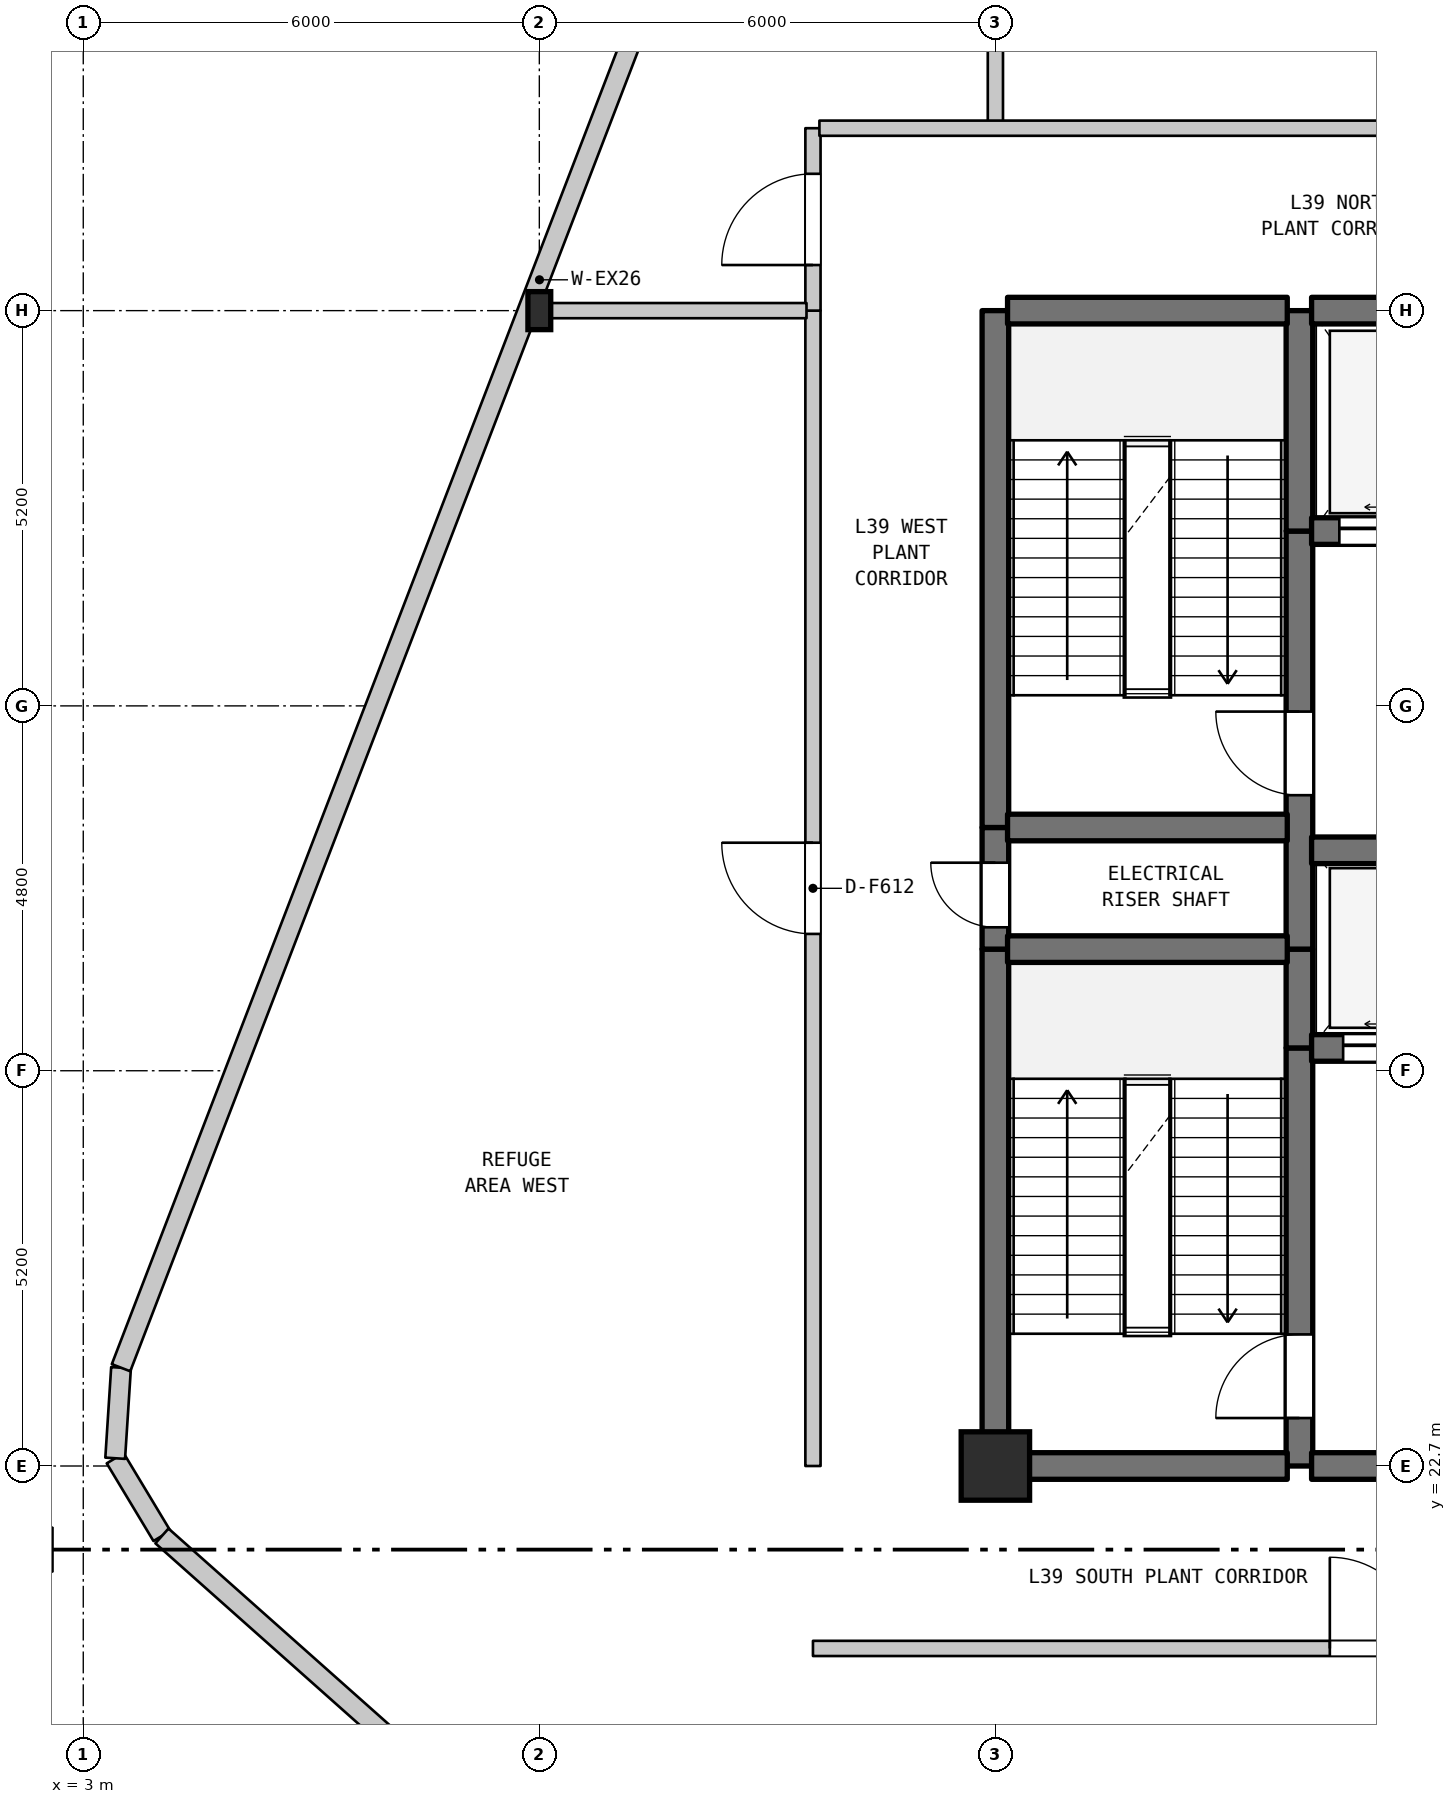
"""IFC4 building model, lengths in metres.
Left out: names, types, materials, properties, quantities, classifications, styles, units other than length and angle.
Written with IfcOpenShell. Run it as: python <this file> out.ifc"""

import sys

from ifc_helpers import new_model, si_unit, direction, frame, frame_2d, origin, origin_2d, place, context, subcontext, project, spatial, rectangle, i_section, extrude, element, fill, save


model = new_model("IFC4")
c1 = context("Model", 3, precision=1e-05, world=origin(), true_north=direction((0.0, 1.0)))
c2 = subcontext(c1, "Body", "Model", "MODEL_VIEW")
j1 = project(units=[si_unit("LENGTHUNIT", "METRE"), si_unit("PLANEANGLEUNIT", "RADIAN")], contexts=[c1])
p1 = place(None, origin())
s1 = spatial("IfcSite", under=j1, at=p1, CompositionType="ELEMENT")
p2 = place(p1, origin())
s2 = spatial("IfcBuilding", under=s1, at=p2, CompositionType="ELEMENT")
p3 = place(p2, frame((0.0, 0.0, 159.4)))
s3 = spatial("IfcBuildingStorey", under=s2, at=p3, CompositionType="ELEMENT", Elevation=159.4)
p4 = place(p3, frame((9.0, 37.9, 0.0), z_axis=(0.0, 0.0, 1.0), x_axis=(1.0, 0.0, 0.0)))
e1 = element("IfcColumn", 1, at=p4, inside=s3, PredefinedType="COLUMN", context=c2, shape_type="SweptSolid", body=[
    extrude(i_section(OverallWidth=0.3, OverallDepth=0.5, WebThickness=0.014, FlangeThickness=0.028, FilletRadius=0.027, at=origin_2d()), origin(), (0.0, 0.0, 1.0), 5.2),
])
p5 = place(p3, frame((15.0, 22.7, 0.0), z_axis=(0.0, 0.0, 1.0), x_axis=(1.0, 0.0, 0.0)))
e2 = element("IfcColumn", 2, at=p5, inside=s3, PredefinedType="COLUMN", context=c2, shape_type="SweptSolid", body=[
    extrude(rectangle(XDim=0.9, YDim=0.9, at=origin_2d()), origin(), (0.0, 0.0, 1.0), 5.2),
])
p6 = place(p3, frame((4.035, 21.78, 0.0), z_axis=(0.0, 0.0, 1.0), x_axis=(-0.51560906497, 0.856823956318, 0.0)))
e3 = element("IfcWall", 3, at=p6, inside=s3, PredefinedType="STANDARD", context=c2, shape_type="SweptSolid", body=[
    extrude(rectangle(XDim=1.193, YDim=0.26, at=frame_2d((0.596, 0.0))), origin(), (0.0, 0.0, 1.0), 4.89),
])
p7 = place(p3, frame((3.42, 22.802, 0.0), z_axis=(0.0, 0.0, 1.0), x_axis=(0.064645147091, 0.997908314906, 0.0)))
e4 = element("IfcWall", 4, at=p7, inside=s3, PredefinedType="STANDARD", context=c2, shape_type="SweptSolid", body=[
    extrude(rectangle(XDim=1.193, YDim=0.26, at=frame_2d((0.597, 0.0))), origin(), (0.0, 0.0, 1.0), 4.89),
])
p8 = place(p3, frame((3.497, 23.993, 0.0), z_axis=(0.0, 0.0, 1.0), x_axis=(0.358990281293, 0.93334129767, 0.0)))
e5 = element("IfcWall", 5, at=p8, inside=s3, PredefinedType="STANDARD", context=c2, shape_type="SweptSolid", body=[
    extrude(rectangle(XDim=30.669, YDim=0.26, at=frame_2d((15.335, 0.0))), origin(), (0.0, 0.0, 1.0), 4.89),
])
p9 = place(p3, frame((12.6, 22.7, 0.0), z_axis=(0.0, 0.0, 1.0), x_axis=(0.0, 1.0, 0.0)))
e6 = element("IfcWall", 6, at=p9, inside=s3, PredefinedType="STANDARD", context=c2, shape_type="SweptSolid", body=[
    extrude(rectangle(XDim=15.2, YDim=0.2, at=frame_2d((7.6, 0.0))), origin(), (0.0, 0.0, 1.0), 4.89),
])
p10 = place(p9, frame((7.0, 0.0, 0.0)))
e7 = element("IfcOpeningElement", 7, at=p10, cuts=e6, PredefinedType="OPENING", context=c2, shape_type="SweptSolid", body=[
    extrude(rectangle(XDim=1.2, YDim=2.2, at=frame_2d((0.6, 1.1))), frame((0.0, 0.11, 0.0), z_axis=(0.0, -1.0, 0.0), x_axis=(1.0, 0.0, 0.0)), (0.0, 0.0, 1.0), 0.22),
])
p11 = place(p3, frame((12.6, 37.9, 0.0), z_axis=(0.0, 0.0, 1.0), x_axis=(0.0, 1.0, 0.0)))
e8 = element("IfcWall", 8, at=p11, inside=s3, PredefinedType="STANDARD", context=c2, shape_type="SweptSolid", body=[
    extrude(rectangle(XDim=2.4, YDim=0.2, at=frame_2d((1.2, 0.0))), origin(), (0.0, 0.0, 1.0), 4.89),
])
p12 = place(p11, frame((0.6, 0.0, 0.0)))
e9 = element("IfcOpeningElement", 9, at=p12, cuts=e8, PredefinedType="OPENING", context=c2, shape_type="SweptSolid", body=[
    extrude(rectangle(XDim=1.2, YDim=2.2, at=frame_2d((0.6, 1.1))), frame((0.0, 0.11, 0.0), z_axis=(0.0, -1.0, 0.0), x_axis=(1.0, 0.0, 0.0)), (0.0, 0.0, 1.0), 0.22),
])
p13 = place(p3, frame((15.0, 22.7, 0.0), z_axis=(0.0, 0.0, 1.0), x_axis=(0.0, 1.0, 0.0)))
e10 = element("IfcWall", 10, at=p13, inside=s3, PredefinedType="SHEAR", context=c2, shape_type="SweptSolid", body=[
    extrude(rectangle(XDim=6.8, YDim=0.35, at=frame_2d((3.4, 0.0))), origin(), (0.0, 0.0, 1.0), 4.89),
])
p14 = place(p3, frame((15.0, 29.5, 0.0), z_axis=(0.0, 0.0, 1.0), x_axis=(0.0, 1.0, 0.0)))
e11 = element("IfcWall", 11, at=p14, inside=s3, PredefinedType="SHEAR", context=c2, shape_type="SweptSolid", body=[
    extrude(rectangle(XDim=1.6, YDim=0.35, at=frame_2d((0.8, 0.0))), origin(), (0.0, 0.0, 1.0), 4.89),
])
p15 = place(p14, frame((0.287, 0.0, 0.0)))
e12 = element("IfcOpeningElement", 12, at=p15, cuts=e11, PredefinedType="OPENING", context=c2, shape_type="SweptSolid", body=[
    extrude(rectangle(XDim=0.85, YDim=2.1, at=frame_2d((0.425, 1.05))), frame((0.0, 0.185, 0.0), z_axis=(0.0, -1.0, 0.0), x_axis=(1.0, 0.0, 0.0)), (0.0, 0.0, 1.0), 0.37),
])
p16 = place(p3, frame((15.0, 31.1, 0.0), z_axis=(0.0, 0.0, 1.0), x_axis=(0.0, 1.0, 0.0)))
e13 = element("IfcWall", 13, at=p16, inside=s3, PredefinedType="SHEAR", context=c2, shape_type="SweptSolid", body=[
    extrude(rectangle(XDim=6.8, YDim=0.35, at=frame_2d((3.4, 0.0))), origin(), (0.0, 0.0, 1.0), 4.89),
])
p17 = place(p3, frame((15.0, 40.3, 0.0), z_axis=(0.0, 0.0, 1.0), x_axis=(0.0, 1.0, 0.0)))
e14 = element("IfcWall", 14, at=p17, inside=s3, PredefinedType="STANDARD", context=c2, shape_type="SweptSolid", body=[
    extrude(rectangle(XDim=12.933, YDim=0.2, at=frame_2d((6.466, 0.0))), origin(), (0.0, 0.0, 1.0), 4.89),
])
p18 = place(p3, frame((19.0, 22.7, 0.0), z_axis=(0.0, 0.0, 1.0), x_axis=(0.0, 1.0, 0.0)))
e15 = element("IfcWall", 15, at=p18, inside=s3, PredefinedType="SHEAR", context=c2, shape_type="SweptSolid", body=[
    extrude(rectangle(XDim=5.5, YDim=0.35, at=frame_2d((2.75, 0.0))), origin(), (0.0, 0.0, 1.0), 4.89),
])
p19 = place(p18, frame((0.631, 0.0, 0.0)))
e16 = element("IfcOpeningElement", 16, at=p19, cuts=e15, PredefinedType="OPENING", context=c2, shape_type="SweptSolid", body=[
    extrude(rectangle(XDim=1.1, YDim=2.15, at=frame_2d((0.55, 1.075))), frame((0.0, 0.185, 0.0), z_axis=(0.0, -1.0, 0.0), x_axis=(1.0, 0.0, 0.0)), (0.0, 0.0, 1.0), 0.37),
])
p20 = place(p3, frame((19.0, 28.2, 0.0), z_axis=(0.0, 0.0, 1.0), x_axis=(0.0, 1.0, 0.0)))
e17 = element("IfcWall", 17, at=p20, inside=s3, PredefinedType="SHEAR", context=c2, shape_type="SweptSolid", body=[
    extrude(rectangle(XDim=1.3, YDim=0.35, at=frame_2d((0.65, 0.0))), origin(), (0.0, 0.0, 1.0), 4.89),
])
p21 = place(p3, frame((19.0, 29.5, 0.0), z_axis=(0.0, 0.0, 1.0), x_axis=(0.0, 1.0, 0.0)))
e18 = element("IfcWall", 18, at=p21, inside=s3, PredefinedType="SHEAR", context=c2, shape_type="SweptSolid", body=[
    extrude(rectangle(XDim=5.5, YDim=0.35, at=frame_2d((2.75, 0.0))), origin(), (0.0, 0.0, 1.0), 4.89),
])
p22 = place(p21, frame((2.025, 0.0, 0.0)))
e19 = element("IfcOpeningElement", 19, at=p22, cuts=e18, PredefinedType="OPENING", context=c2, shape_type="SweptSolid", body=[
    extrude(rectangle(XDim=1.1, YDim=2.15, at=frame_2d((0.55, 1.075))), frame((0.0, 0.185, 0.0), z_axis=(0.0, -1.0, 0.0), x_axis=(1.0, 0.0, 0.0)), (0.0, 0.0, 1.0), 0.37),
])
p23 = place(p3, frame((19.0, 35.0, 0.0), z_axis=(0.0, 0.0, 1.0), x_axis=(0.0, 1.0, 0.0)))
e20 = element("IfcWall", 20, at=p23, inside=s3, PredefinedType="SHEAR", context=c2, shape_type="SweptSolid", body=[
    extrude(rectangle(XDim=2.9, YDim=0.35, at=frame_2d((1.45, 0.0))), origin(), (0.0, 0.0, 1.0), 4.89),
])
p24 = place(p3, frame((12.6, 20.3, 0.0), z_axis=(0.0, 0.0, 1.0), x_axis=(1.0, 0.0, 0.0)))
e21 = element("IfcWall", 21, at=p24, inside=s3, PredefinedType="STANDARD", context=c2, shape_type="SweptSolid", body=[
    extrude(rectangle(XDim=20.315, YDim=0.2, at=frame_2d((10.157, 0.0))), origin(), (0.0, 0.0, 1.0), 4.89),
])
p25 = place(p24, frame((6.8, 0.0, 0.0)))
e22 = element("IfcOpeningElement", 22, at=p25, cuts=e21, PredefinedType="OPENING", context=c2, shape_type="SweptSolid", body=[
    extrude(rectangle(XDim=1.2, YDim=2.2, at=frame_2d((0.6, 1.1))), frame((0.0, 0.11, 0.0), z_axis=(0.0, -1.0, 0.0), x_axis=(1.0, 0.0, 0.0)), (0.0, 0.0, 1.0), 0.22),
])
p26 = place(p24, frame((16.225, 0.0, 0.0)))
e23 = element("IfcOpeningElement", 23, at=p26, cuts=e21, PredefinedType="OPENING", context=c2, shape_type="SweptSolid", body=[
    extrude(rectangle(XDim=1.2, YDim=2.2, at=frame_2d((0.6, 1.1))), frame((0.0, 0.11, 0.0), z_axis=(0.0, -1.0, 0.0), x_axis=(1.0, 0.0, 0.0)), (0.0, 0.0, 1.0), 0.22),
])
p27 = place(p3, frame((15.16, 22.7, 0.0), z_axis=(0.0, 0.0, 1.0), x_axis=(1.0, 0.0, 0.0)))
e24 = element("IfcWall", 24, at=p27, inside=s3, PredefinedType="SHEAR", context=c2, shape_type="SweptSolid", body=[
    extrude(rectangle(XDim=3.68, YDim=0.35, at=frame_2d((1.84, 0.0))), origin(), (0.0, 0.0, 1.0), 4.89),
])
p28 = place(p3, frame((19.16, 22.7, 0.0), z_axis=(0.0, 0.0, 1.0), x_axis=(1.0, 0.0, 0.0)))
e25 = element("IfcWall", 25, at=p28, inside=s3, PredefinedType="SHEAR", context=c2, shape_type="SweptSolid", body=[
    extrude(rectangle(XDim=4.48, YDim=0.35, at=frame_2d((2.24, 0.0))), origin(), (0.0, 0.0, 1.0), 4.89),
])
p29 = place(p28, frame((2.99, 0.0, 0.0)))
e26 = element("IfcOpeningElement", 26, at=p29, cuts=e25, PredefinedType="OPENING", context=c2, shape_type="SweptSolid", body=[
    extrude(rectangle(XDim=1.2, YDim=2.2, at=frame_2d((0.6, 1.1))), frame((0.0, 0.185, 0.0), z_axis=(0.0, -1.0, 0.0), x_axis=(1.0, 0.0, 0.0)), (0.0, 0.0, 1.0), 0.37),
])
p30 = place(p3, frame((19.16, 28.2, 0.0), z_axis=(0.0, 0.0, 1.0), x_axis=(1.0, 0.0, 0.0)))
e27 = element("IfcWall", 27, at=p30, inside=s3, PredefinedType="SHEAR", context=c2, shape_type="SweptSolid", body=[
    extrude(rectangle(XDim=4.48, YDim=0.35, at=frame_2d((2.24, 0.0))), origin(), (0.0, 0.0, 1.0), 4.89),
])
p31 = place(p30, frame((0.415, 0.0, 0.0)))
e28 = element("IfcOpeningElement", 28, at=p31, cuts=e27, PredefinedType="OPENING", context=c2, shape_type="SweptSolid", body=[
    extrude(rectangle(XDim=1.25, YDim=2.2, at=frame_2d((0.625, 1.1))), frame((0.0, 0.185, 0.0), z_axis=(0.0, -1.0, 0.0), x_axis=(1.0, 0.0, 0.0)), (0.0, 0.0, 1.0), 0.37),
])
p32 = place(p30, frame((2.815, 0.0, 0.0)))
e29 = element("IfcOpeningElement", 29, at=p32, cuts=e27, PredefinedType="OPENING", context=c2, shape_type="SweptSolid", body=[
    extrude(rectangle(XDim=1.25, YDim=2.2, at=frame_2d((0.625, 1.1))), frame((0.0, 0.185, 0.0), z_axis=(0.0, -1.0, 0.0), x_axis=(1.0, 0.0, 0.0)), (0.0, 0.0, 1.0), 0.37),
])
p33 = place(p3, frame((15.16, 29.5, 0.0), z_axis=(0.0, 0.0, 1.0), x_axis=(1.0, 0.0, 0.0)))
e30 = element("IfcWall", 30, at=p33, inside=s3, PredefinedType="SHEAR", context=c2, shape_type="SweptSolid", body=[
    extrude(rectangle(XDim=3.68, YDim=0.35, at=frame_2d((1.84, 0.0))), origin(), (0.0, 0.0, 1.0), 4.89),
])
p34 = place(p3, frame((19.16, 30.8, 0.0), z_axis=(0.0, 0.0, 1.0), x_axis=(1.0, 0.0, 0.0)))
e31 = element("IfcWall", 31, at=p34, inside=s3, PredefinedType="SHEAR", context=c2, shape_type="SweptSolid", body=[
    extrude(rectangle(XDim=4.48, YDim=0.35, at=frame_2d((2.24, 0.0))), origin(), (0.0, 0.0, 1.0), 4.89),
])
p35 = place(p3, frame((15.16, 31.1, 0.0), z_axis=(0.0, 0.0, 1.0), x_axis=(1.0, 0.0, 0.0)))
e32 = element("IfcWall", 32, at=p35, inside=s3, PredefinedType="SHEAR", context=c2, shape_type="SweptSolid", body=[
    extrude(rectangle(XDim=3.68, YDim=0.35, at=frame_2d((1.84, 0.0))), origin(), (0.0, 0.0, 1.0), 4.89),
])
p36 = place(p3, frame((19.16, 35.0, 0.0), z_axis=(0.0, 0.0, 1.0), x_axis=(1.0, 0.0, 0.0)))
e33 = element("IfcWall", 33, at=p36, inside=s3, PredefinedType="SHEAR", context=c2, shape_type="SweptSolid", body=[
    extrude(rectangle(XDim=4.48, YDim=0.35, at=frame_2d((2.24, 0.0))), origin(), (0.0, 0.0, 1.0), 4.89),
])
p37 = place(p36, frame((0.365, 0.0, 0.0)))
e34 = element("IfcOpeningElement", 34, at=p37, cuts=e33, PredefinedType="OPENING", context=c2, shape_type="SweptSolid", body=[
    extrude(rectangle(XDim=1.35, YDim=2.2, at=frame_2d((0.675, 1.1))), frame((0.0, 0.185, 0.0), z_axis=(0.0, -1.0, 0.0), x_axis=(1.0, 0.0, 0.0)), (0.0, 0.0, 1.0), 0.37),
])
p38 = place(p36, frame((2.765, 0.0, 0.0)))
e35 = element("IfcOpeningElement", 35, at=p38, cuts=e33, PredefinedType="OPENING", context=c2, shape_type="SweptSolid", body=[
    extrude(rectangle(XDim=1.35, YDim=2.2, at=frame_2d((0.675, 1.1))), frame((0.0, 0.185, 0.0), z_axis=(0.0, -1.0, 0.0), x_axis=(1.0, 0.0, 0.0)), (0.0, 0.0, 1.0), 0.37),
])
p39 = place(p3, frame((8.856, 37.9, 0.0), z_axis=(0.0, 0.0, 1.0), x_axis=(1.0, 0.0, 0.0)))
e36 = element("IfcWall", 36, at=p39, inside=s3, PredefinedType="STANDARD", context=c2, shape_type="SweptSolid", body=[
    extrude(rectangle(XDim=3.659, YDim=0.2, at=frame_2d((1.83, 0.0))), origin(), (0.0, 0.0, 1.0), 4.59),
])
p40 = place(p3, frame((15.16, 37.9, 0.0), z_axis=(0.0, 0.0, 1.0), x_axis=(1.0, 0.0, 0.0)))
e37 = element("IfcWall", 37, at=p40, inside=s3, PredefinedType="SHEAR", context=c2, shape_type="SweptSolid", body=[
    extrude(rectangle(XDim=3.68, YDim=0.35, at=frame_2d((1.84, 0.0))), origin(), (0.0, 0.0, 1.0), 4.89),
])
p41 = place(p3, frame((19.16, 37.9, 0.0), z_axis=(0.0, 0.0, 1.0), x_axis=(1.0, 0.0, 0.0)))
e38 = element("IfcWall", 38, at=p41, inside=s3, PredefinedType="SHEAR", context=c2, shape_type="SweptSolid", body=[
    extrude(rectangle(XDim=4.48, YDim=0.35, at=frame_2d((2.24, 0.0))), origin(), (0.0, 0.0, 1.0), 4.89),
])
p42 = place(p3, frame((12.685, 40.3, 0.0), z_axis=(0.0, 0.0, 1.0), x_axis=(1.0, 0.0, 0.0)))
e39 = element("IfcWall", 39, at=p42, inside=s3, PredefinedType="STANDARD", context=c2, shape_type="SweptSolid", body=[
    extrude(rectangle(XDim=20.23, YDim=0.2, at=frame_2d((10.115, 0.0))), origin(), (0.0, 0.0, 1.0), 4.89),
])
p43 = place(p42, frame((12.14, 0.0, 0.0)))
e40 = element("IfcOpeningElement", 40, at=p43, cuts=e39, PredefinedType="OPENING", context=c2, shape_type="SweptSolid", body=[
    extrude(rectangle(XDim=1.2, YDim=2.2, at=frame_2d((0.6, 1.1))), frame((0.0, 0.11, 0.0), z_axis=(0.0, -1.0, 0.0), x_axis=(1.0, 0.0, 0.0)), (0.0, 0.0, 1.0), 0.22),
])
p44 = place(p3, frame((15.848, 11.28, 0.0), z_axis=(0.0, 0.0, 1.0), x_axis=(-0.74740761421, 0.664365756358, 0.0)))
e41 = element("IfcWall", 41, at=p44, inside=s3, PredefinedType="STANDARD", context=c2, shape_type="SweptSolid", body=[
    extrude(rectangle(XDim=15.805, YDim=0.26, at=frame_2d((7.903, 0.0))), origin(), (0.0, 0.0, 1.0), 4.89),
])
p45 = place(p10, origin())
e42 = element("IfcDoor", 42, at=p45, inside=s3, OperationType="SINGLE_SWING_RIGHT", PredefinedType="DOOR", context=c2, shape_type="SweptSolid", body=[
    extrude(rectangle(XDim=1.2, YDim=2.2, at=frame_2d((0.6, 1.1))), frame((0.0, 0.025, 0.0), z_axis=(0.0, -1.0, 0.0), x_axis=(1.0, 0.0, 0.0)), (0.0, 0.0, 1.0), 0.05),
])
fill(e7, e42)
p46 = place(p12, origin())
e43 = element("IfcDoor", 43, at=p46, inside=s3, OperationType="SINGLE_SWING_LEFT", PredefinedType="DOOR", context=c2, shape_type="SweptSolid", body=[
    extrude(rectangle(XDim=1.2, YDim=2.2, at=frame_2d((0.6, 1.1))), frame((0.0, 0.025, 0.0), z_axis=(0.0, -1.0, 0.0), x_axis=(1.0, 0.0, 0.0)), (0.0, 0.0, 1.0), 0.05),
])
fill(e9, e43)
p47 = place(p15, origin())
e44 = element("IfcDoor", 44, at=p47, inside=s3, OperationType="SINGLE_SWING_RIGHT", PredefinedType="DOOR", context=c2, shape_type="SweptSolid", body=[
    extrude(rectangle(XDim=0.85, YDim=2.1, at=frame_2d((0.425, 1.05))), frame((0.0, 0.025, 0.0), z_axis=(0.0, -1.0, 0.0), x_axis=(1.0, 0.0, 0.0)), (0.0, 0.0, 1.0), 0.05),
])
fill(e12, e44)
p48 = place(p19, origin())
e45 = element("IfcDoor", 45, at=p48, inside=s3, OperationType="SINGLE_SWING_LEFT", PredefinedType="DOOR", context=c2, shape_type="SweptSolid", body=[
    extrude(rectangle(XDim=1.1, YDim=2.15, at=frame_2d((0.55, 1.075))), frame((0.0, 0.025, 0.0), z_axis=(0.0, -1.0, 0.0), x_axis=(1.0, 0.0, 0.0)), (0.0, 0.0, 1.0), 0.05),
])
fill(e16, e45)
p49 = place(p22, origin())
e46 = element("IfcDoor", 46, at=p49, inside=s3, OperationType="SINGLE_SWING_RIGHT", PredefinedType="DOOR", context=c2, shape_type="SweptSolid", body=[
    extrude(rectangle(XDim=1.1, YDim=2.15, at=frame_2d((0.55, 1.075))), frame((0.0, 0.025, 0.0), z_axis=(0.0, -1.0, 0.0), x_axis=(1.0, 0.0, 0.0)), (0.0, 0.0, 1.0), 0.05),
])
fill(e19, e46)
p50 = place(p25, origin())
e47 = element("IfcDoor", 47, at=p50, inside=s3, OperationType="SINGLE_SWING_LEFT", PredefinedType="DOOR", context=c2, shape_type="SweptSolid", body=[
    extrude(rectangle(XDim=1.2, YDim=2.2, at=frame_2d((0.6, 1.1))), frame((0.0, 0.025, 0.0), z_axis=(0.0, -1.0, 0.0), x_axis=(1.0, 0.0, 0.0)), (0.0, 0.0, 1.0), 0.05),
])
fill(e22, e47)
p51 = place(p31, origin())
e48 = element("IfcDoor", 48, at=p51, inside=s3, OperationType="DOUBLE_DOOR_SLIDING", PredefinedType="DOOR", context=c2, shape_type="SweptSolid", body=[
    extrude(rectangle(XDim=1.25, YDim=2.2, at=frame_2d((0.625, 1.1))), frame((0.0, 0.025, 0.0), z_axis=(0.0, -1.0, 0.0), x_axis=(1.0, 0.0, 0.0)), (0.0, 0.0, 1.0), 0.05),
])
fill(e28, e48)
p52 = place(p37, origin())
e49 = element("IfcDoor", 49, at=p52, inside=s3, OperationType="DOUBLE_DOOR_SLIDING", PredefinedType="DOOR", context=c2, shape_type="SweptSolid", body=[
    extrude(rectangle(XDim=1.35, YDim=2.2, at=frame_2d((0.675, 1.1))), frame((0.0, 0.025, 0.0), z_axis=(0.0, -1.0, 0.0), x_axis=(1.0, 0.0, 0.0)), (0.0, 0.0, 1.0), 0.05),
])
fill(e34, e49)
save(model, sys.argv[1])
